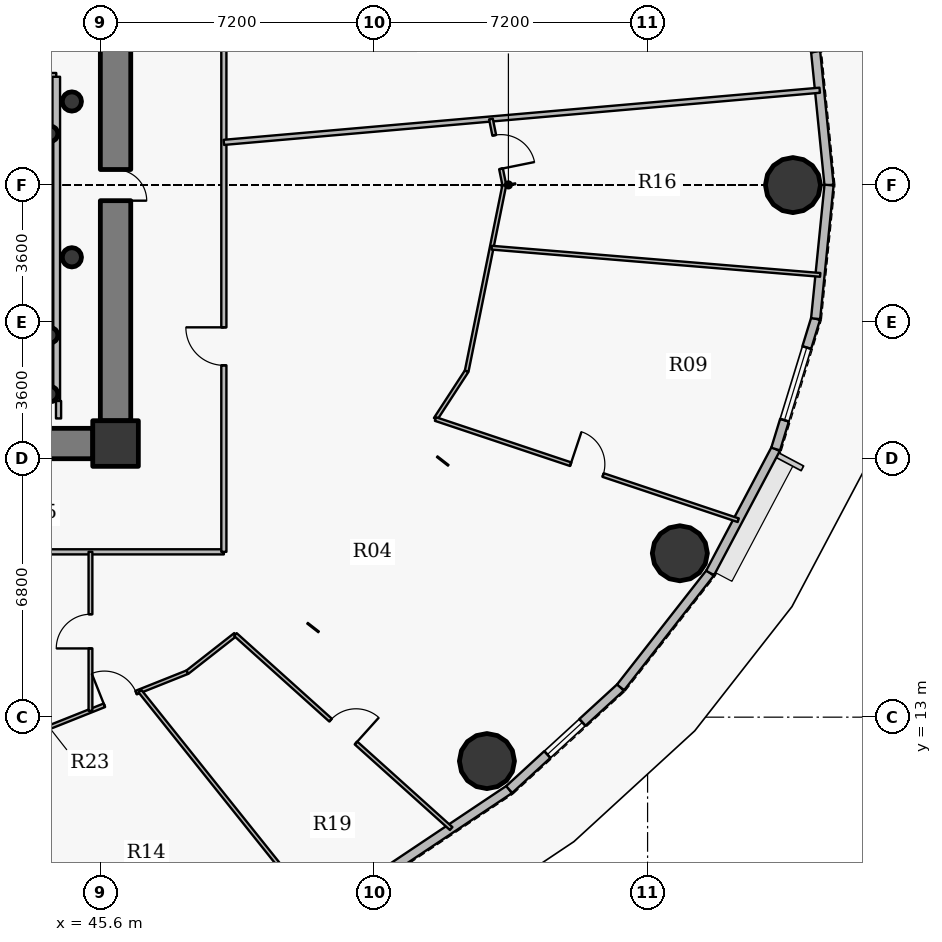
"""IFC4 building model, lengths in metres.
Left out: names, types, materials, properties, quantities, classifications, styles, units other than length and angle.
Written with IfcOpenShell. Run it as: python <this file> out.ifc"""

import sys

from ifc_helpers import new_model, si_unit, direction, frame, frame_2d, origin, origin_2d, place, context, subcontext, project, spatial, rectangle, hollow_circle, extrude, source, transform, mapped, element, fill, save


model = new_model("IFC4")
c1 = context("Model", 3, precision=1e-05, world=origin(), true_north=direction((0.0, 1.0)))
c2 = subcontext(c1, "Body", "Model", "MODEL_VIEW")
j1 = project(units=[si_unit("LENGTHUNIT", "METRE"), si_unit("PLANEANGLEUNIT", "RADIAN")], contexts=[c1])
p1 = place(None, origin())
s1 = spatial("IfcSite", under=j1, at=p1, CompositionType="ELEMENT")
p2 = place(p1, origin())
s2 = spatial("IfcBuilding", under=s1, at=p2, CompositionType="ELEMENT")
p3 = place(p2, frame((0.0, 0.0, 92.4)))
s3 = spatial("IfcBuildingStorey", under=s2, at=p3, CompositionType="ELEMENT", Elevation=92.4)
p4 = place(p3, frame((46.0, 20.2, 0.0), z_axis=(0.0, 0.0, 1.0), x_axis=(1.0, 0.0, 0.0)))
e1 = element("IfcColumn", 1, at=p4, inside=s3, PredefinedType="COLUMN", context=c2, shape_type="SweptSolid", body=[
    extrude(rectangle(XDim=1.2, YDim=1.2, at=origin_2d()), origin(), (0.0, 0.0, 1.0), 4.8),
])
for number, where, z_axis, x_axis in (
    (2, (44.28, 21.5, 0.0), (0.0, 0.0, 1.0), (1.0, 0.0, 0.0)),
    (3, (44.28, 23.05, 0.0), (0.0, 0.0, 1.0), (1.0, 0.0, 0.0)),
    (4, (44.28, 28.35, 0.0), (0.0, 0.0, 1.0), (1.0, 0.0, 0.0)),
):
    element("IfcColumn", number, at=place(p3, frame(where, z_axis=z_axis, x_axis=x_axis)), inside=s3, PredefinedType="COLUMN", context=c2, shape_type="SweptSolid", body=[
        extrude(hollow_circle(Radius=0.203, WallThickness=0.016, at=origin_2d()), origin(), (0.0, 0.0, 1.0), 4.8),
    ])
p5 = place(p3, frame((46.0, 33.2, 0.0), z_axis=(0.0, 0.0, 1.0), x_axis=(0.0, -1.0, 0.0)))
e5 = element("IfcWall", 5, at=p5, inside=s3, PredefinedType="SHEAR", context=c2, shape_type="SweptSolid", body=[
    extrude(rectangle(XDim=12.4, YDim=0.8, at=frame_2d((6.2, 0.0))), origin(), (0.0, 0.0, 1.0), 4.0),
])
p6 = place(p5, frame((5.79, 0.0, 0.0)))
e6 = element("IfcOpeningElement", 6, at=p6, cuts=e5, PredefinedType="OPENING", context=c2, shape_type="SweptSolid", body=[
    extrude(rectangle(XDim=0.82, YDim=2.1, at=origin_2d()), frame((0.41, 0.41, 1.05), z_axis=(0.0, -1.0, 0.0), x_axis=(1.0, 0.0, 0.0)), (0.0, 0.0, 1.0), 0.82),
])
p7 = place(p3, frame((45.4, 20.2, 0.0), z_axis=(0.0, 0.0, 1.0), x_axis=(-1.0, 0.0, 0.0)))
e7 = element("IfcWall", 7, at=p7, inside=s3, PredefinedType="SHEAR", context=c2, shape_type="SweptSolid", body=[
    extrude(rectangle(XDim=18.8, YDim=0.8, at=frame_2d((9.4, 0.0))), origin(), (0.0, 0.0, 1.0), 4.0),
])
p8 = place(p7, frame((10.15, 0.0, 0.0)))
e8 = element("IfcOpeningElement", 8, at=p8, cuts=e7, PredefinedType="OPENING", context=c2, shape_type="SweptSolid", body=[
    extrude(rectangle(XDim=1.15, YDim=2.15, at=origin_2d()), frame((0.575, 0.41, 1.075), z_axis=(0.0, -1.0, 0.0), x_axis=(1.0, 0.0, 0.0)), (0.0, 0.0, 1.0), 0.82),
])
for number, where, z_axis, x_axis in (
    (9, (63.825, 27.0, -0.3), (0.0, 0.0, 1.0), (1.0, 0.0, 0.0)),
    (10, (55.773, 11.844, -0.3), (0.0, 0.0, 1.0), (1.0, 0.0, 0.0)),
    (11, (60.849, 17.312, -0.3), (0.0, 0.0, 1.0), (1.0, 0.0, 0.0)),
):
    element("IfcColumn", number, at=place(p3, frame(where, z_axis=z_axis, x_axis=x_axis)), inside=s3, PredefinedType="COLUMN", context=c2, shape_type="SweptSolid", body=[
        extrude(hollow_circle(Radius=0.725, WallThickness=0.042, at=origin_2d()), origin(), (0.0, 0.0, 1.0), 5.1),
    ])
for number, where, z_axis, x_axis in (
    (12, (44.85, 25.1, 0.0), (0.0, 0.0, 1.0), (1.0, 0.0, 0.0)),
    (13, (44.85, 29.2, 0.0), (0.0, 0.0, 1.0), (1.0, 0.0, 0.0)),
):
    element("IfcColumn", number, at=place(p3, frame(where, z_axis=z_axis, x_axis=x_axis)), inside=s3, PredefinedType="COLUMN", context=c2, shape_type="SweptSolid", body=[
        extrude(hollow_circle(Radius=0.254, WallThickness=0.02, at=origin_2d()), origin(), (0.0, 0.0, 1.0), 4.8),
    ])
p9 = place(p3, frame((64.422, 30.515, 0.0), z_axis=(0.0, 0.0, 1.0), x_axis=(0.099989468229, -0.994988495533, 0.0)))
e14 = element("IfcWall", 14, at=p9, inside=s3, PredefinedType="SOLIDWALL", context=c2, shape_type="SweptSolid", body=[
    extrude(rectangle(XDim=3.533, YDim=0.24, at=frame_2d((1.767, 0.0))), origin(), (0.0, 0.0, 1.0), 4.55),
])
p10 = place(p3, frame((63.37, 33.945, 0.0), z_axis=(0.0, 0.0, 1.0), x_axis=(0.293124431344, -0.956074300329, 0.0)))
e15 = element("IfcWall", 15, at=p10, inside=s3, PredefinedType="SOLIDWALL", context=c2, shape_type="SweptSolid", body=[
    extrude(rectangle(XDim=3.587, YDim=0.24, at=frame_2d((1.793, 0.0))), origin(), (0.0, 0.0, 1.0), 4.55),
])
p11 = place(p3, frame((56.358, 11.097, 0.0), z_axis=(0.0, 0.0, 1.0), x_axis=(-0.831221811447, -0.555940914284, 0.0)))
e16 = element("IfcWall", 16, at=p11, inside=s3, PredefinedType="SOLIDWALL", context=c2, shape_type="SweptSolid", body=[
    extrude(rectangle(XDim=4.13, YDim=0.24, at=frame_2d((2.065, 0.0))), origin(), (0.0, 0.0, 1.0), 4.55),
])
p12 = place(p3, frame((59.289, 13.783, 0.0), z_axis=(0.0, 0.0, 1.0), x_axis=(-0.737113356241, -0.675769117414, 0.0)))
e17 = element("IfcWall", 17, at=p12, inside=s3, PredefinedType="SOLIDWALL", context=c2, shape_type="SweptSolid", body=[
    extrude(rectangle(XDim=3.976, YDim=0.24, at=frame_2d((1.988, 0.0))), origin(), (0.0, 0.0, 1.0), 4.55),
])
p13 = place(p12, frame((1.363, 0.0, 0.9)))
e18 = element("IfcOpeningElement", 18, at=p13, cuts=e17, PredefinedType="OPENING", context=c2, shape_type="SweptSolid", body=[
    extrude(rectangle(XDim=1.25, YDim=1.65, at=origin_2d()), frame((0.625, 0.13, 0.825), z_axis=(0.0, -1.0, 0.0), x_axis=(1.0, 0.0, 0.0)), (0.0, 0.0, 1.0), 0.26),
])
p14 = place(p3, frame((61.645, 16.794, 0.0), z_axis=(0.0, 0.0, 1.0), x_axis=(-0.616272103517, -0.787533297345, 0.0)))
e19 = element("IfcWall", 19, at=p14, inside=s3, PredefinedType="SOLIDWALL", context=c2, shape_type="SweptSolid", body=[
    extrude(rectangle(XDim=3.823, YDim=0.24, at=frame_2d((1.912, 0.0))), origin(), (0.0, 0.0, 1.0), 4.55),
])
p15 = place(p3, frame((63.37, 20.055, 0.0), z_axis=(0.0, 0.0, 1.0), x_axis=(-0.467614004126, -0.883932770716, 0.0)))
e20 = element("IfcWall", 20, at=p15, inside=s3, PredefinedType="SOLIDWALL", context=c2, shape_type="SweptSolid", body=[
    extrude(rectangle(XDim=3.689, YDim=0.24, at=frame_2d((1.844, 0.0))), origin(), (0.0, 0.0, 1.0), 4.55),
])
p16 = place(p3, frame((64.422, 23.485, 0.0), z_axis=(0.0, 0.0, 1.0), x_axis=(-0.293124431344, -0.956074300329, 0.0)))
e21 = element("IfcWall", 21, at=p16, inside=s3, PredefinedType="SOLIDWALL", context=c2, shape_type="SweptSolid", body=[
    extrude(rectangle(XDim=3.587, YDim=0.24, at=frame_2d((1.793, 0.0))), origin(), (0.0, 0.0, 1.0), 4.55),
])
p17 = place(p16, frame((0.794, 0.0, 0.9)))
e22 = element("IfcOpeningElement", 22, at=p17, cuts=e21, PredefinedType="OPENING", context=c2, shape_type="SweptSolid", body=[
    extrude(rectangle(XDim=2.0, YDim=1.75, at=origin_2d()), frame((1.0, 0.13, 0.875), z_axis=(0.0, -1.0, 0.0), x_axis=(1.0, 0.0, 0.0)), (0.0, 0.0, 1.0), 0.26),
])
p18 = place(p3, frame((64.775, 27.0, 0.0), z_axis=(0.0, 0.0, 1.0), x_axis=(-0.099989468229, -0.994988495533, 0.0)))
e23 = element("IfcWall", 23, at=p18, inside=s3, PredefinedType="SOLIDWALL", context=c2, shape_type="SweptSolid", body=[
    extrude(rectangle(XDim=3.533, YDim=0.24, at=frame_2d((1.767, 0.0))), origin(), (0.0, 0.0, 1.0), 4.55),
])
p19 = place(p3, frame((35.95, 29.85, 0.0), z_axis=(0.0, 0.0, 1.0), x_axis=(1.0, 0.0, 0.0)))
e24 = element("IfcWall", 24, at=p19, inside=s3, PredefinedType="PARTITIONING", context=c2, shape_type="SweptSolid", body=[
    extrude(rectangle(XDim=8.49, YDim=0.2, at=frame_2d((4.245, 0.0))), origin(), (0.0, 0.0, 1.0), 4.135),
])
p20 = place(p19, frame((6.1, 0.0, 0.0)))
e25 = element("IfcOpeningElement", 25, at=p20, cuts=e24, PredefinedType="OPENING", context=c2, shape_type="SweptSolid", body=[
    extrude(rectangle(XDim=1.2, YDim=2.15, at=origin_2d()), frame((0.6, 0.11, 1.075), z_axis=(0.0, -1.0, 0.0), x_axis=(1.0, 0.0, 0.0)), (0.0, 0.0, 1.0), 0.22),
])
p21 = place(p19, frame((0.37, 0.0, 0.0)))
e26 = element("IfcOpeningElement", 26, at=p21, cuts=e24, PredefinedType="OPENING", context=c2, shape_type="SweptSolid", body=[
    extrude(rectangle(XDim=1.15, YDim=2.15, at=origin_2d()), frame((0.575, 0.11, 1.075), z_axis=(0.0, -1.0, 0.0), x_axis=(1.0, 0.0, 0.0)), (0.0, 0.0, 1.0), 0.22),
])
p22 = place(p19, frame((2.425, 0.0, 0.0)))
e27 = element("IfcOpeningElement", 27, at=p22, cuts=e24, PredefinedType="OPENING", context=c2, shape_type="SweptSolid", body=[
    extrude(rectangle(XDim=1.05, YDim=2.15, at=origin_2d()), frame((0.525, 0.11, 1.075), z_axis=(0.0, -1.0, 0.0), x_axis=(1.0, 0.0, 0.0)), (0.0, 0.0, 1.0), 0.22),
])
p23 = place(p3, frame((38.477, 17.35, 0.0), z_axis=(0.0, 0.0, 1.0), x_axis=(1.0, 0.0, 0.0)))
e28 = element("IfcWall", 28, at=p23, inside=s3, PredefinedType="PARTITIONING", context=c2, shape_type="SweptSolid", body=[
    extrude(rectangle(XDim=10.373, YDim=0.135, at=frame_2d((5.187, 0.0))), origin(), (0.0, 0.0, 1.0), 3.985),
])
p24 = place(p3, frame((40.41, 17.35, 0.0), z_axis=(0.0, 0.0, 1.0), x_axis=(0.415695001708, -0.909504076711, 0.0)))
e29 = element("IfcWall", 29, at=p24, inside=s3, PredefinedType="PARTITIONING", context=c2, shape_type="SweptSolid", body=[
    extrude(rectangle(XDim=12.652, YDim=0.135, at=frame_2d((6.326, 0.0))), origin(), (0.0, 0.0, 1.0), 3.985),
])
p25 = place(p3, frame((42.251, 11.934, 0.0), z_axis=(0.0, 0.0, 1.0), x_axis=(0.928803554156, 0.370572473055, 0.0)))
e30 = element("IfcWall", 30, at=p25, inside=s3, PredefinedType="PARTITIONING", context=c2, shape_type="SweptSolid", body=[
    extrude(rectangle(XDim=6.072, YDim=0.1, at=frame_2d((3.036, 0.0))), origin(), (0.0, 0.0, 1.0), 3.985),
])
p26 = place(p25, frame((3.719, 0.0, 0.0)))
e31 = element("IfcOpeningElement", 31, at=p26, cuts=e30, PredefinedType="OPENING", context=c2, shape_type="SweptSolid", body=[
    extrude(rectangle(XDim=0.9, YDim=2.1, at=origin_2d()), frame((0.45, 0.06, 1.05), z_axis=(0.0, -1.0, 0.0), x_axis=(1.0, 0.0, 0.0)), (0.0, 0.0, 1.0), 0.12),
])
p27 = place(p3, frame((44.44, 21.33, 0.0), z_axis=(0.0, 0.0, 1.0), x_axis=(0.0, 1.0, 0.0)))
e32 = element("IfcWall", 32, at=p27, inside=s3, PredefinedType="PARTITIONING", context=c2, shape_type="SweptSolid", body=[
    extrude(rectangle(XDim=8.52, YDim=0.2, at=frame_2d((4.26, 0.0))), origin(), (0.0, 0.0, 1.0), 4.55),
])
p28 = place(p3, frame((45.34, 13.167, 0.0), z_axis=(0.0, 0.0, 1.0), x_axis=(0.0, 1.0, 0.0)))
e33 = element("IfcWall", 33, at=p28, inside=s3, PredefinedType="PARTITIONING", context=c2, shape_type="SweptSolid", body=[
    extrude(rectangle(XDim=4.184, YDim=0.1, at=frame_2d((2.092, 0.0))), origin(), (0.0, 0.0, 1.0), 4.55),
])
p29 = place(p28, frame((1.642, 0.0, 0.0)))
e34 = element("IfcOpeningElement", 34, at=p29, cuts=e33, PredefinedType="OPENING", context=c2, shape_type="SweptSolid", body=[
    extrude(rectangle(XDim=0.9, YDim=2.1, at=origin_2d()), frame((0.45, 0.06, 1.05), z_axis=(0.0, -1.0, 0.0), x_axis=(1.0, 0.0, 0.0)), (0.0, 0.0, 1.0), 0.12),
])
p30 = place(p3, frame((46.642, 13.686, 0.0), z_axis=(0.0, 0.0, 1.0), x_axis=(0.624332747249, -0.781158511899, 0.0)))
e35 = element("IfcWall", 35, at=p30, inside=s3, PredefinedType="PARTITIONING", context=c2, shape_type="SweptSolid", body=[
    extrude(rectangle(XDim=7.315, YDim=0.1, at=frame_2d((3.658, 0.0))), origin(), (0.0, 0.0, 1.0), 3.985),
])
p31 = place(p3, frame((47.891, 14.184, 0.0), z_axis=(0.0, 0.0, 1.0), x_axis=(0.787373320688, 0.616476482819, 0.0)))
e36 = element("IfcWall", 36, at=p31, inside=s3, PredefinedType="PARTITIONING", context=c2, shape_type="SweptSolid", body=[
    extrude(rectangle(XDim=1.604, YDim=0.1, at=frame_2d((0.802, 0.0))), origin(), (0.0, 0.0, 1.0), 4.55),
])
p32 = place(p3, frame((48.85, 17.35, 0.0), z_axis=(0.0, 0.0, 1.0), x_axis=(0.0, 1.0, 0.0)))
e37 = element("IfcWall", 37, at=p32, inside=s3, PredefinedType="PARTITIONING", context=c2, shape_type="SweptSolid", body=[
    extrude(rectangle(XDim=19.3, YDim=0.135, at=frame_2d((9.65, 0.0))), origin(), (0.0, 0.0, 1.0), 3.985),
])
p33 = place(p32, frame((4.907, 0.0, 0.0)))
e38 = element("IfcOpeningElement", 38, at=p33, cuts=e37, PredefinedType="OPENING", context=c2, shape_type="SweptSolid", body=[
    extrude(rectangle(XDim=1.0, YDim=2.15, at=origin_2d()), frame((0.5, 0.078, 1.075), z_axis=(0.0, -1.0, 0.0), x_axis=(1.0, 0.0, 0.0)), (0.0, 0.0, 1.0), 0.155),
])
p34 = place(p32, frame((14.492, 0.0, 0.0)))
e39 = element("IfcOpeningElement", 39, at=p34, cuts=e37, PredefinedType="OPENING", context=c2, shape_type="SweptSolid", body=[
    extrude(rectangle(XDim=1.05, YDim=2.15, at=origin_2d()), frame((0.525, 0.078, 1.075), z_axis=(0.0, -1.0, 0.0), x_axis=(1.0, 0.0, 0.0)), (0.0, 0.0, 1.0), 0.155),
])
p35 = place(p3, frame((48.85, 28.124, 0.0), z_axis=(0.0, 0.0, 1.0), x_axis=(0.99619417209, 0.087161754768, 0.0)))
e40 = element("IfcWall", 40, at=p35, inside=s3, PredefinedType="PARTITIONING", context=c2, shape_type="SweptSolid", body=[
    extrude(rectangle(XDim=15.739, YDim=0.135, at=frame_2d((7.869, 0.0))), origin(), (0.0, 0.0, 1.0), 3.985),
])
p36 = place(p3, frame((49.154, 15.173, 0.0), z_axis=(0.0, 0.0, 1.0), x_axis=(0.743623217159, -0.668598916318, 0.0)))
e41 = element("IfcWall", 41, at=p36, inside=s3, PredefinedType="PARTITIONING", context=c2, shape_type="SweptSolid", body=[
    extrude(rectangle(XDim=7.634, YDim=0.1, at=frame_2d((3.817, 0.0))), origin(), (0.0, 0.0, 1.0), 3.985),
])
p37 = place(p36, frame((3.367, 0.0, 0.0)))
e42 = element("IfcOpeningElement", 42, at=p37, cuts=e41, PredefinedType="OPENING", context=c2, shape_type="SweptSolid", body=[
    extrude(rectangle(XDim=0.9, YDim=2.1, at=origin_2d()), frame((0.45, 0.06, 1.05), z_axis=(0.0, -1.0, 0.0), x_axis=(1.0, 0.0, 0.0)), (0.0, 0.0, 1.0), 0.12),
])
p38 = place(p3, frame((54.42, 20.844, 0.0), z_axis=(0.0, 0.0, 1.0), x_axis=(0.545376249248, 0.838191354499, 0.0)))
e43 = element("IfcWall", 43, at=p38, inside=s3, PredefinedType="PARTITIONING", context=c2, shape_type="SweptSolid", body=[
    extrude(rectangle(XDim=1.504, YDim=0.1, at=frame_2d((0.752, 0.0))), origin(), (0.0, 0.0, 1.0), 4.55),
])
p39 = place(p3, frame((54.42, 20.844, 0.0), z_axis=(0.0, 0.0, 1.0), x_axis=(0.948444660119, -0.316942781416, 0.0)))
e44 = element("IfcWall", 44, at=p39, inside=s3, PredefinedType="PARTITIONING", context=c2, shape_type="SweptSolid", body=[
    extrude(rectangle(XDim=8.399, YDim=0.1, at=frame_2d((4.199, 0.0))), origin(), (0.0, 0.0, 1.0), 3.985),
])
p40 = place(p39, frame((3.749, 0.0, 0.0)))
e45 = element("IfcOpeningElement", 45, at=p40, cuts=e44, PredefinedType="OPENING", context=c2, shape_type="SweptSolid", body=[
    extrude(rectangle(XDim=0.9, YDim=2.1, at=origin_2d()), frame((0.45, 0.06, 1.05), z_axis=(0.0, -1.0, 0.0), x_axis=(1.0, 0.0, 0.0)), (0.0, 0.0, 1.0), 0.12),
])
p41 = place(p3, frame((55.24, 22.105, 0.0), z_axis=(0.0, 0.0, 1.0), x_axis=(0.198240417912, 0.980153425085, 0.0)))
e46 = element("IfcWall", 46, at=p41, inside=s3, PredefinedType="PARTITIONING", context=c2, shape_type="SweptSolid", body=[
    extrude(rectangle(XDim=4.994, YDim=0.1, at=frame_2d((2.497, 0.0))), origin(), (0.0, 0.0, 1.0), 3.985),
])
p42 = place(p3, frame((55.878, 28.739, 0.0), z_axis=(0.0, 0.0, 1.0), x_axis=(0.198285544288, -0.980144296992, 0.0)))
e47 = element("IfcWall", 47, at=p42, inside=s3, PredefinedType="PARTITIONING", context=c2, shape_type="SweptSolid", body=[
    extrude(rectangle(XDim=1.774, YDim=0.1, at=frame_2d((0.887, 0.0))), origin(), (0.0, 0.0, 1.0), 3.985),
])
p43 = place(p42, frame((0.437, 0.0, 0.0)))
e48 = element("IfcOpeningElement", 48, at=p43, cuts=e47, PredefinedType="OPENING", context=c2, shape_type="SweptSolid", body=[
    extrude(rectangle(XDim=0.9, YDim=2.1, at=origin_2d()), frame((0.45, 0.06, 1.05), z_axis=(0.0, -1.0, 0.0), x_axis=(1.0, 0.0, 0.0)), (0.0, 0.0, 1.0), 0.12),
])
p44 = place(p3, frame((55.897, 25.353, 0.0), z_axis=(0.0, 0.0, 1.0), x_axis=(0.996592182633, -0.08248649292, 0.0)))
e49 = element("IfcWall", 49, at=p44, inside=s3, PredefinedType="PARTITIONING", context=c2, shape_type="SweptSolid", body=[
    extrude(rectangle(XDim=8.675, YDim=0.1, at=frame_2d((4.337, 0.0))), origin(), (0.0, 0.0, 1.0), 3.985),
])
p45 = place(p3, frame((44.5, 20.86, 0.0), z_axis=(0.0, 0.0, 1.0), x_axis=(0.0, 1.0, 0.0)))
e50 = element("IfcWall", 50, at=p45, inside=s3, PredefinedType="PARTITIONING", context=c2, shape_type="SweptSolid", body=[
    extrude(rectangle(XDim=0.46, YDim=0.135, at=frame_2d((0.23, 0.0))), origin(), (0.0, 0.0, 1.0), 4.55),
])
p46 = place(p3, frame((45.41, 19.8, 0.0), z_axis=(0.0, 0.0, 1.0), x_axis=(1.0, 0.0, 0.0)))
e51 = element("IfcWall", 51, at=p46, inside=s3, PredefinedType="PARTITIONING", context=c2, shape_type="SweptSolid", body=[
    extrude(rectangle(XDim=0.99, YDim=0.135, at=frame_2d((0.495, 0.0))), origin(), (0.0, 0.0, 1.0), 3.985),
])
p47 = place(p3, frame((46.4, 20.107, 0.0), z_axis=(0.0, 0.0, 1.0), x_axis=(0.0, 1.0, 0.0)))
e52 = element("IfcWall", 52, at=p47, inside=s3, PredefinedType="PARTITIONING", context=c2, shape_type="SweptSolid", body=[
    extrude(rectangle(XDim=0.683, YDim=0.135, at=frame_2d((0.341, 0.0))), origin(), (0.0, 0.0, 1.0), 4.55),
])
m1 = source(origin(), c2, "Body", "SweptSolid", [
    extrude(rectangle(XDim=2.0, YDim=1.75, at=origin_2d()), frame((1.0, 0.03, 0.875), z_axis=(0.0, -1.0, 0.0), x_axis=(1.0, 0.0, 0.0)), (0.0, 0.0, 1.0), 0.06),
])
p48 = place(p17, origin())
e53 = element("IfcWindow", 53, at=p48, inside=s3, PartitioningType="DOUBLE_PANEL_VERTICAL", PredefinedType="WINDOW", context=c2, shape_type="MappedRepresentation", body=[
    mapped(m1, transform((0.0, 0.0, 0.0), x_axis=(1.0, 0.0, 0.0), y_axis=(0.0, 1.0, 0.0), z_axis=(0.0, 0.0, 1.0), scale=1.0)),
])
fill(e22, e53)
m2 = source(origin(), c2, "Body", "SweptSolid", [
    extrude(rectangle(XDim=1.25, YDim=1.65, at=origin_2d()), frame((0.625, 0.03, 0.825), z_axis=(0.0, -1.0, 0.0), x_axis=(1.0, 0.0, 0.0)), (0.0, 0.0, 1.0), 0.06),
])
p49 = place(p13, origin())
e54 = element("IfcWindow", 54, at=p49, inside=s3, PartitioningType="SINGLE_PANEL", PredefinedType="WINDOW", context=c2, shape_type="MappedRepresentation", body=[
    mapped(m2, transform((0.0, 0.0, 0.0), x_axis=(1.0, 0.0, 0.0), y_axis=(0.0, 1.0, 0.0), z_axis=(0.0, 0.0, 1.0), scale=1.0)),
])
fill(e18, e54)
m3 = source(origin(), c2, "Body", "SweptSolid", [
    extrude(rectangle(XDim=0.82, YDim=2.1, at=origin_2d()), frame((0.41, 0.025, 1.05), z_axis=(0.0, -1.0, 0.0), x_axis=(1.0, 0.0, 0.0)), (0.0, 0.0, 1.0), 0.05),
])
p50 = place(p6, origin())
e55 = element("IfcDoor", 55, at=p50, inside=s3, OperationType="SINGLE_SWING_RIGHT", PredefinedType="DOOR", context=c2, shape_type="MappedRepresentation", body=[
    mapped(m3, transform((0.0, 0.0, 0.0), x_axis=(1.0, 0.0, 0.0), y_axis=(0.0, 1.0, 0.0), z_axis=(0.0, 0.0, 1.0), scale=1.0)),
])
fill(e6, e55)
m4 = source(origin(), c2, "Body", "SweptSolid", [
    extrude(rectangle(XDim=1.0, YDim=2.15, at=origin_2d()), frame((0.5, 0.025, 1.075), z_axis=(0.0, -1.0, 0.0), x_axis=(1.0, 0.0, 0.0)), (0.0, 0.0, 1.0), 0.05),
])
p51 = place(p33, origin())
e56 = element("IfcDoor", 56, at=p51, inside=s3, OperationType="SINGLE_SWING_RIGHT", PredefinedType="DOOR", context=c2, shape_type="MappedRepresentation", body=[
    mapped(m4, transform((0.0, 0.0, 0.0), x_axis=(1.0, 0.0, 0.0), y_axis=(0.0, 1.0, 0.0), z_axis=(0.0, 0.0, 1.0), scale=1.0)),
])
fill(e38, e56)
m5 = source(origin(), c2, "Body", "SweptSolid", [
    extrude(rectangle(XDim=0.9, YDim=2.1, at=origin_2d()), frame((0.45, 0.025, 1.05), z_axis=(0.0, -1.0, 0.0), x_axis=(1.0, 0.0, 0.0)), (0.0, 0.0, 1.0), 0.05),
])
p52 = place(p26, origin())
e57 = element("IfcDoor", 57, at=p52, inside=s3, OperationType="SINGLE_SWING_LEFT", PredefinedType="DOOR", context=c2, shape_type="MappedRepresentation", body=[
    mapped(m5, transform((0.0, 0.0, 0.0), x_axis=(1.0, 0.0, 0.0), y_axis=(0.0, 1.0, 0.0), z_axis=(0.0, 0.0, 1.0), scale=1.0)),
])
fill(e31, e57)
p53 = place(p37, origin())
e58 = element("IfcDoor", 58, at=p53, inside=s3, OperationType="SINGLE_SWING_RIGHT", PredefinedType="DOOR", context=c2, shape_type="MappedRepresentation", body=[
    mapped(m5, transform((0.0, 0.0, 0.0), x_axis=(1.0, 0.0, 0.0), y_axis=(0.0, 1.0, 0.0), z_axis=(0.0, 0.0, 1.0), scale=1.0)),
])
fill(e42, e58)
p54 = place(p40, origin())
e59 = element("IfcDoor", 59, at=p54, inside=s3, OperationType="SINGLE_SWING_LEFT", PredefinedType="DOOR", context=c2, shape_type="MappedRepresentation", body=[
    mapped(m5, transform((0.0, 0.0, 0.0), x_axis=(1.0, 0.0, 0.0), y_axis=(0.0, 1.0, 0.0), z_axis=(0.0, 0.0, 1.0), scale=1.0)),
])
fill(e45, e59)
p55 = place(p43, origin())
e60 = element("IfcDoor", 60, at=p55, inside=s3, OperationType="SINGLE_SWING_RIGHT", PredefinedType="DOOR", context=c2, shape_type="MappedRepresentation", body=[
    mapped(m5, transform((0.0, 0.0, 0.0), x_axis=(1.0, 0.0, 0.0), y_axis=(0.0, 1.0, 0.0), z_axis=(0.0, 0.0, 1.0), scale=1.0)),
])
fill(e48, e60)
p56 = place(p29, origin())
e61 = element("IfcDoor", 61, at=p56, inside=s3, OperationType="SINGLE_SWING_LEFT", PredefinedType="DOOR", context=c2, shape_type="MappedRepresentation", body=[
    mapped(m5, transform((0.0, 0.0, 0.0), x_axis=(1.0, 0.0, 0.0), y_axis=(0.0, 1.0, 0.0), z_axis=(0.0, 0.0, 1.0), scale=1.0)),
])
fill(e34, e61)
save(model, sys.argv[1])
